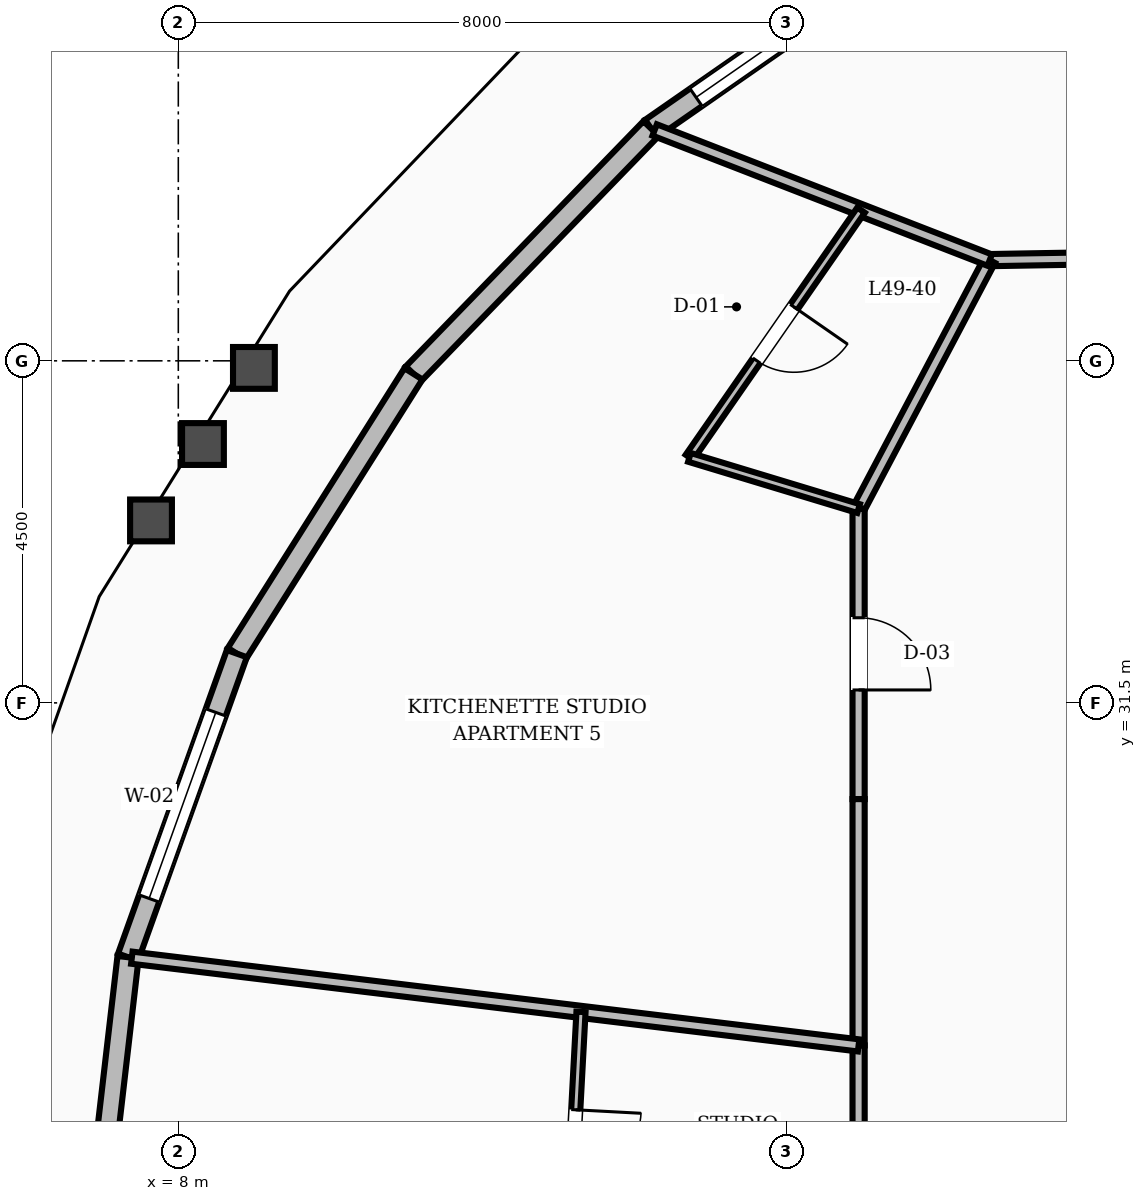
"""IFC4 building model, lengths in metres.
Left out: names, types, materials, properties, quantities, classifications, styles, units other than length and angle.
Written with IfcOpenShell. Run it as: python <this file> out.ifc"""

import sys

from ifc_helpers import new_model, si_unit, direction, frame, frame_2d, origin, place, context, subcontext, project, spatial, rectangle, extrude, element, fill, save


model = new_model("IFC4")
c1 = context("Model", 3, precision=1e-05, world=origin(), true_north=direction((0.0, 1.0)))
c2 = subcontext(c1, "Body", "Model", "MODEL_VIEW")
j1 = project(units=[si_unit("LENGTHUNIT", "METRE"), si_unit("PLANEANGLEUNIT", "RADIAN")], contexts=[c1])
p1 = place(None, origin())
s1 = spatial("IfcSite", under=j1, at=p1, CompositionType="ELEMENT")
p2 = place(p1, origin())
s2 = spatial("IfcBuilding", under=s1, at=p2, CompositionType="ELEMENT")
p3 = place(p2, frame((0.0, 0.0, 189.2)))
s3 = spatial("IfcBuildingStorey", under=s2, at=p3, CompositionType="ELEMENT", Elevation=189.2)
p4 = place(p3, frame((18.031, 41.703, 0.0), z_axis=(0.0, 0.0, 1.0), x_axis=(-0.821202162047, -0.570637370885, 0.0)))
e1 = element("IfcWall", 1, at=p4, inside=s3, PredefinedType="STANDARD", context=c2, shape_type="SweptSolid", body=[
    extrude(rectangle(XDim=4.64, YDim=0.28, at=frame_2d((2.32, 0.0))), origin(), (0.0, 0.0, 1.0), 2.82),
])
p5 = place(p4, frame((0.72, 0.0, 0.8)))
e2 = element("IfcOpeningElement", 2, at=p5, cuts=e1, PredefinedType="OPENING", context=c2, shape_type="SweptSolid", body=[
    extrude(rectangle(XDim=3.2, YDim=1.65, at=frame_2d((1.6, 0.825))), frame((0.0, 0.15, 0.0), z_axis=(0.0, -1.0, 0.0), x_axis=(1.0, 0.0, 0.0)), (0.0, 0.0, 1.0), 0.3),
])
p6 = place(p3, frame((14.22, 39.055, 0.0), z_axis=(0.0, 0.0, 1.0), x_axis=(-0.695935353848, -0.718104437575, 0.0)))
e3 = element("IfcWall", 3, at=p6, inside=s3, PredefinedType="STANDARD", context=c2, shape_type="SweptSolid", body=[
    extrude(rectangle(XDim=4.493, YDim=0.28, at=frame_2d((2.247, 0.0))), origin(), (0.0, 0.0, 1.0), 2.82),
])
p7 = place(p3, frame((11.094, 35.829, 0.0), z_axis=(0.0, 0.0, 1.0), x_axis=(-0.533779843876, -0.845623484934, 0.0)))
e4 = element("IfcWall", 4, at=p7, inside=s3, PredefinedType="STANDARD", context=c2, shape_type="SweptSolid", body=[
    extrude(rectangle(XDim=4.353, YDim=0.28, at=frame_2d((2.176, 0.0))), origin(), (0.0, 0.0, 1.0), 2.82),
])
p8 = place(p3, frame((8.77, 32.148, 0.0), z_axis=(0.0, 0.0, 1.0), x_axis=(-0.337262137127, -0.941410776898, 0.0)))
e5 = element("IfcWall", 5, at=p8, inside=s3, PredefinedType="STANDARD", context=c2, shape_type="SweptSolid", body=[
    extrude(rectangle(XDim=4.243, YDim=0.28, at=frame_2d((2.121, 0.0))), origin(), (0.0, 0.0, 1.0), 2.82),
])
p9 = place(p8, frame((0.821, 0.0, 0.8)))
e6 = element("IfcOpeningElement", 6, at=p9, cuts=e5, PredefinedType="OPENING", context=c2, shape_type="SweptSolid", body=[
    extrude(rectangle(XDim=2.6, YDim=1.65, at=frame_2d((1.3, 0.825))), frame((0.0, 0.15, 0.0), z_axis=(0.0, -1.0, 0.0), x_axis=(1.0, 0.0, 0.0)), (0.0, 0.0, 1.0), 0.3),
])
p10 = place(p3, frame((7.339, 28.154, 0.0), z_axis=(0.0, 0.0, 1.0), x_axis=(-0.115537027225, -0.99330317393, 0.0)))
e7 = element("IfcWall", 7, at=p10, inside=s3, PredefinedType="STANDARD", context=c2, shape_type="SweptSolid", body=[
    extrude(rectangle(XDim=4.182, YDim=0.28, at=frame_2d((2.091, 0.0))), origin(), (0.0, 0.0, 1.0), 2.82),
])
p11 = place(p3, frame((23.046, 37.4, 0.0), z_axis=(0.0, 0.0, 1.0), x_axis=(-0.999853038912, -0.017143528788, 0.0)))
e8 = element("IfcWall", 8, at=p11, inside=s3, PredefinedType="SOLIDWALL", context=c2, shape_type="SweptSolid", body=[
    extrude(rectangle(XDim=4.372, YDim=0.16, at=frame_2d((2.186, 0.0))), origin(), (0.0, 0.0, 1.0), 2.8),
])
p12 = place(p3, frame((18.675, 37.325, 0.0), z_axis=(0.0, 0.0, 1.0), x_axis=(-0.466737093093, -0.884396113702, 0.0)))
e9 = element("IfcWall", 9, at=p12, inside=s3, PredefinedType="SOLIDWALL", context=c2, shape_type="SweptSolid", body=[
    extrude(rectangle(XDim=3.696, YDim=0.16, at=frame_2d((1.848, 0.0))), origin(), (0.0, 0.0, 1.0), 2.8),
])
p13 = place(p3, frame((16.95, 34.056, 0.0), z_axis=(0.0, 0.0, 1.0), x_axis=(0.0, -1.0, 0.0)))
e10 = element("IfcWall", 10, at=p13, inside=s3, PredefinedType="SOLIDWALL", context=c2, shape_type="SweptSolid", body=[
    extrude(rectangle(XDim=3.822, YDim=0.16, at=frame_2d((1.911, 0.0))), origin(), (0.0, 0.0, 1.0), 2.8),
])
p14 = place(p13, frame((1.436, 0.0, 0.0)))
e11 = element("IfcOpeningElement", 11, at=p14, cuts=e10, PredefinedType="OPENING", context=c2, shape_type="SweptSolid", body=[
    extrude(rectangle(XDim=0.95, YDim=2.1, at=frame_2d((0.475, 1.05))), frame((0.0, 0.09, 0.0), z_axis=(0.0, -1.0, 0.0), x_axis=(1.0, 0.0, 0.0)), (0.0, 0.0, 1.0), 0.18),
])
p15 = place(p3, frame((16.95, 30.234, 0.0), z_axis=(0.0, 0.0, 1.0), x_axis=(0.0, -1.0, 0.0)))
e12 = element("IfcWall", 12, at=p15, inside=s3, PredefinedType="SOLIDWALL", context=c2, shape_type="SweptSolid", body=[
    extrude(rectangle(XDim=3.24, YDim=0.16, at=frame_2d((1.62, 0.0))), origin(), (0.0, 0.0, 1.0), 2.8),
])
p16 = place(p3, frame((16.95, 26.994, 0.0), z_axis=(0.0, 0.0, 1.0), x_axis=(0.0, -1.0, 0.0)))
e13 = element("IfcWall", 13, at=p16, inside=s3, PredefinedType="SOLIDWALL", context=c2, shape_type="SweptSolid", body=[
    extrude(rectangle(XDim=2.994, YDim=0.16, at=frame_2d((1.497, 0.0))), origin(), (0.0, 0.0, 1.0), 2.8),
])
p17 = place(p3, frame((18.675, 37.325, 0.0), z_axis=(0.0, 0.0, 1.0), x_axis=(-0.932133473627, 0.362114881419, 0.0)))
e14 = element("IfcWall", 14, at=p17, inside=s3, PredefinedType="SOLIDWALL", context=c2, shape_type="SweptSolid", body=[
    extrude(rectangle(XDim=4.729, YDim=0.16, at=frame_2d((2.365, 0.0))), origin(), (0.0, 0.0, 1.0), 2.8),
])
p18 = place(p3, frame((16.982, 37.983, 0.0), z_axis=(0.0, 0.0, 1.0), x_axis=(-0.570197054883, -0.821507954072, 0.0)))
e15 = element("IfcWall", 15, at=p18, inside=s3, PredefinedType="PARTITIONING", context=c2, shape_type="SweptSolid", body=[
    extrude(rectangle(XDim=3.96, YDim=0.12, at=frame_2d((1.98, 0.0))), origin(), (0.0, 0.0, 1.0), 2.8),
])
p19 = place(p18, frame((1.55, 0.0, 0.0)))
e16 = element("IfcOpeningElement", 16, at=p19, cuts=e15, PredefinedType="OPENING", context=c2, shape_type="SweptSolid", body=[
    extrude(rectangle(XDim=0.86, YDim=2.1, at=frame_2d((0.43, 1.05))), frame((0.0, 0.07, 0.0), z_axis=(0.0, -1.0, 0.0), x_axis=(1.0, 0.0, 0.0)), (0.0, 0.0, 1.0), 0.14),
])
p20 = place(p3, frame((16.95, 34.056, 0.0), z_axis=(0.0, 0.0, 1.0), x_axis=(-0.957115319978, 0.289707204369, 0.0)))
e17 = element("IfcWall", 17, at=p20, inside=s3, PredefinedType="PARTITIONING", context=c2, shape_type="SweptSolid", body=[
    extrude(rectangle(XDim=2.325, YDim=0.12, at=frame_2d((1.163, 0.0))), origin(), (0.0, 0.0, 1.0), 2.8),
])
p21 = place(p3, frame((16.95, 26.994, 0.0), z_axis=(0.0, 0.0, 1.0), x_axis=(-0.992794313126, 0.119830930167, 0.0)))
e18 = element("IfcWall", 18, at=p21, inside=s3, PredefinedType="SOLIDWALL", context=c2, shape_type="SweptSolid", body=[
    extrude(rectangle(XDim=9.631, YDim=0.16, at=frame_2d((4.815, 0.0))), origin(), (0.0, 0.0, 1.0), 2.8),
])
p22 = place(p3, frame((13.298, 27.435, 0.0), z_axis=(0.0, 0.0, 1.0), x_axis=(-0.053378441483, -0.99857435476, 0.0)))
e19 = element("IfcWall", 19, at=p22, inside=s3, PredefinedType="PARTITIONING", context=c2, shape_type="SweptSolid", body=[
    extrude(rectangle(XDim=3.439, YDim=0.12, at=frame_2d((1.72, 0.0))), origin(), (0.0, 0.0, 1.0), 2.8),
])
p23 = place(p22, frame((1.29, 0.0, 0.0)))
e20 = element("IfcOpeningElement", 20, at=p23, cuts=e19, PredefinedType="OPENING", context=c2, shape_type="SweptSolid", body=[
    extrude(rectangle(XDim=0.86, YDim=2.1, at=frame_2d((0.43, 1.05))), frame((0.0, 0.07, 0.0), z_axis=(0.0, -1.0, 0.0), x_axis=(1.0, 0.0, 0.0)), (0.0, 0.0, 1.0), 0.14),
])
p24 = place(p5, origin())
e21 = element("IfcWindow", 21, at=p24, inside=s3, PartitioningType="SINGLE_PANEL", PredefinedType="WINDOW", context=c2, shape_type="SweptSolid", body=[
    extrude(rectangle(XDim=3.2, YDim=1.65, at=frame_2d((1.6, 0.825))), frame((0.0, 0.03, 0.0), z_axis=(0.0, -1.0, 0.0), x_axis=(1.0, 0.0, 0.0)), (0.0, 0.0, 1.0), 0.06),
])
fill(e2, e21)
p25 = place(p9, origin())
e22 = element("IfcWindow", 22, at=p25, inside=s3, PartitioningType="SINGLE_PANEL", PredefinedType="WINDOW", context=c2, shape_type="SweptSolid", body=[
    extrude(rectangle(XDim=2.6, YDim=1.65, at=frame_2d((1.3, 0.825))), frame((0.0, 0.03, 0.0), z_axis=(0.0, -1.0, 0.0), x_axis=(1.0, 0.0, 0.0)), (0.0, 0.0, 1.0), 0.06),
])
fill(e6, e22)
p26 = place(p19, origin())
e23 = element("IfcDoor", 23, at=p26, inside=s3, OperationType="SINGLE_SWING_LEFT", PredefinedType="DOOR", context=c2, shape_type="SweptSolid", body=[
    extrude(rectangle(XDim=0.86, YDim=2.1, at=frame_2d((0.43, 1.05))), frame((0.0, 0.025, 0.0), z_axis=(0.0, -1.0, 0.0), x_axis=(1.0, 0.0, 0.0)), (0.0, 0.0, 1.0), 0.05),
])
fill(e16, e23)
p27 = place(p14, origin())
e24 = element("IfcDoor", 24, at=p27, inside=s3, OperationType="SINGLE_SWING_RIGHT", PredefinedType="DOOR", context=c2, shape_type="SweptSolid", body=[
    extrude(rectangle(XDim=0.95, YDim=2.1, at=frame_2d((0.475, 1.05))), frame((0.0, 0.025, 0.0), z_axis=(0.0, -1.0, 0.0), x_axis=(1.0, 0.0, 0.0)), (0.0, 0.0, 1.0), 0.05),
])
fill(e11, e24)
p28 = place(p23, origin())
e25 = element("IfcDoor", 25, at=p28, inside=s3, OperationType="SINGLE_SWING_LEFT", PredefinedType="DOOR", context=c2, shape_type="SweptSolid", body=[
    extrude(rectangle(XDim=0.86, YDim=2.1, at=frame_2d((0.43, 1.05))), frame((0.0, 0.025, 0.0), z_axis=(0.0, -1.0, 0.0), x_axis=(1.0, 0.0, 0.0)), (0.0, 0.0, 1.0), 0.05),
])
fill(e20, e25)
save(model, sys.argv[1])
